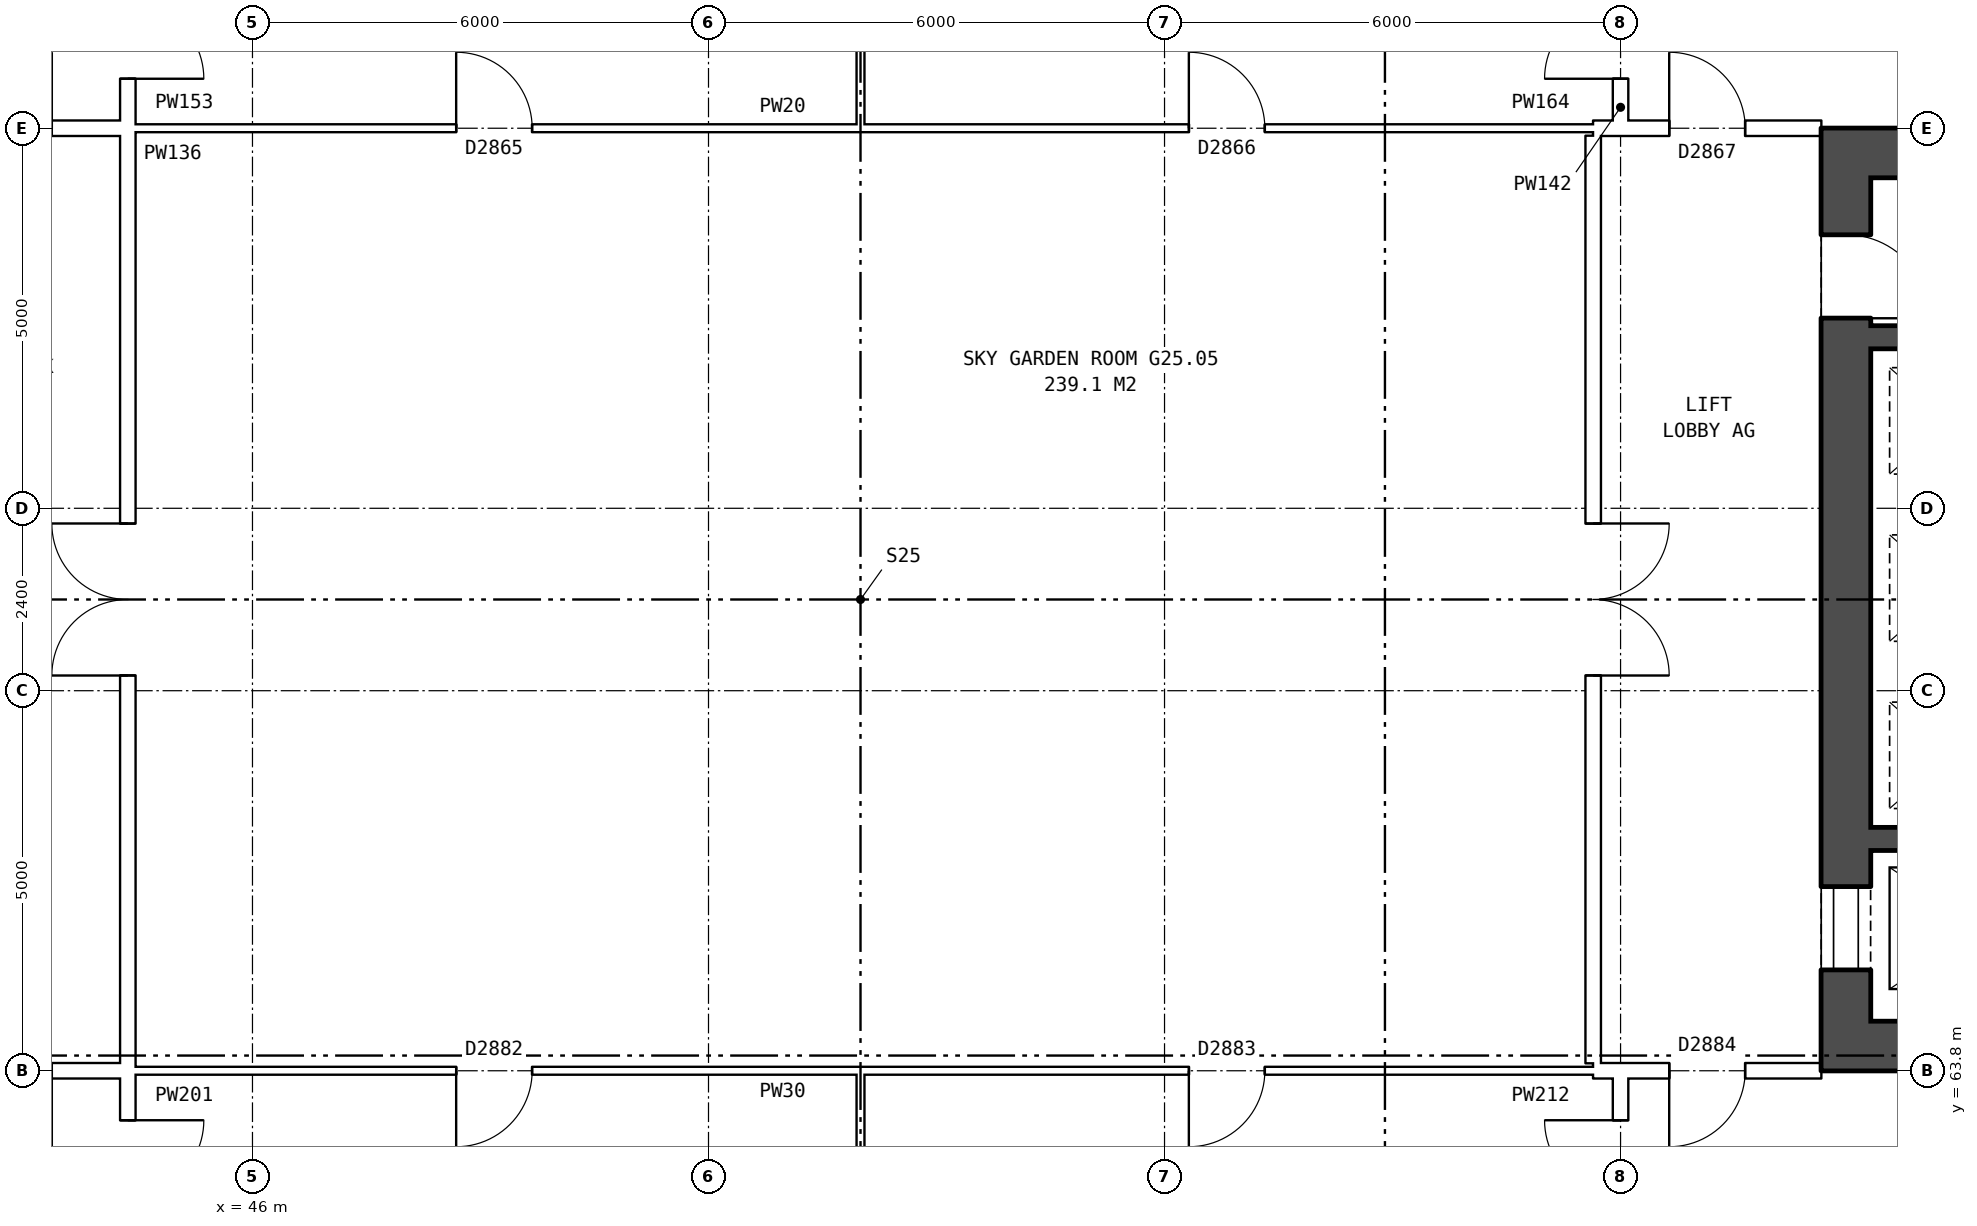
"""IFC4 building model, lengths in metres.
Left out: names, types, materials, properties, quantities, classifications, styles, units other than length and angle.
Written with IfcOpenShell. Run it as: python <this file> out.ifc"""

import sys

from ifc_helpers import new_model, si_unit, direction, frame, frame_2d, origin, place, context, subcontext, project, spatial, rectangle, extrude, element, fill, save


model = new_model("IFC4")
c1 = context("Model", 3, precision=1e-05, world=origin(), true_north=direction((0.0, 1.0)))
c2 = subcontext(c1, "Body", "Model", "MODEL_VIEW")
j1 = project(units=[si_unit("LENGTHUNIT", "METRE"), si_unit("PLANEANGLEUNIT", "RADIAN")], contexts=[c1])
p1 = place(None, origin())
s1 = spatial("IfcSite", under=j1, at=p1, CompositionType="ELEMENT")
p2 = place(p1, origin())
s2 = spatial("IfcBuilding", under=s1, at=p2, CompositionType="ELEMENT")
p3 = place(p2, frame((0.0, 0.0, 90.2)))
s3 = spatial("IfcBuildingStorey", under=s2, at=p3, CompositionType="ELEMENT", Elevation=90.2)
p4 = place(p3, frame((66.965, 64.45, 0.0), z_axis=(0.0, 0.0, 1.0), x_axis=(0.0, 1.0, 0.0)))
e1 = element("IfcWall", 1, at=p4, inside=s3, PredefinedType="SHEAR", context=c2, shape_type="SweptSolid", body=[
    extrude(rectangle(XDim=11.1, YDim=0.65, at=frame_2d((5.55, 0.0))), origin(), (0.0, 0.0, 1.0), 5.6),
])
p5 = place(p4, frame((0.675, 0.0, 0.0)))
e2 = element("IfcOpeningElement", 2, at=p5, cuts=e1, PredefinedType="OPENING", context=c2, shape_type="SweptSolid", body=[
    extrude(rectangle(XDim=1.1, YDim=2.1, at=frame_2d((0.55, 1.05))), frame((0.0, 0.335, 0.0), z_axis=(0.0, -1.0, 0.0), x_axis=(1.0, 0.0, 0.0)), (0.0, 0.0, 1.0), 0.67),
])
p6 = place(p4, frame((9.25, 0.0, 0.0)))
e3 = element("IfcOpeningElement", 3, at=p6, cuts=e1, PredefinedType="OPENING", context=c2, shape_type="SweptSolid", body=[
    extrude(rectangle(XDim=1.1, YDim=2.1, at=frame_2d((0.55, 1.05))), frame((0.0, 0.335, 0.0), z_axis=(0.0, -1.0, 0.0), x_axis=(1.0, 0.0, 0.0)), (0.0, 0.0, 1.0), 0.67),
])
for number, where, z_axis, x_axis in (
    (4, (66.64, 64.125, 0.0), (0.0, 0.0, 1.0), (1.0, 0.0, 0.0)),
    (5, (66.64, 75.875, 0.0), (0.0, 0.0, 1.0), (1.0, 0.0, 0.0)),
):
    element("IfcWall", number, at=place(p3, frame(where, z_axis=z_axis, x_axis=x_axis)), inside=s3, PredefinedType="SHEAR", context=c2, shape_type="SweptSolid", body=[
        extrude(rectangle(XDim=9.0, YDim=0.65, at=frame_2d((4.5, 0.0))), origin(), (0.0, 0.0, 1.0), 5.6),
    ])
p7 = place(p3, frame((67.29, 66.85, 0.0), z_axis=(0.0, 0.0, 1.0), x_axis=(1.0, 0.0, 0.0)))
e6 = element("IfcWall", 6, at=p7, inside=s3, PredefinedType="SHEAR", context=c2, shape_type="SweptSolid", body=[
    extrude(rectangle(XDim=3.37, YDim=0.3, at=frame_2d((1.685, 0.0))), origin(), (0.0, 0.0, 1.0), 5.6),
])
p8 = place(p3, frame((67.29, 73.45, 0.0), z_axis=(0.0, 0.0, 1.0), x_axis=(1.0, 0.0, 0.0)))
e7 = element("IfcWall", 7, at=p8, inside=s3, PredefinedType="SHEAR", context=c2, shape_type="SweptSolid", body=[
    extrude(rectangle(XDim=2.25, YDim=0.3, at=frame_2d((1.125, 0.0))), origin(), (0.0, 0.0, 1.0), 5.6),
])
p9 = place(p3, frame((63.64, 63.9, 0.0), z_axis=(0.0, 0.0, 1.0), x_axis=(0.0, 1.0, 0.0)))
e8 = element("IfcWall", 8, at=p9, inside=s3, PredefinedType="PARTITIONING", context=c2, shape_type="SweptSolid", body=[
    extrude(rectangle(XDim=12.2, YDim=0.2, at=frame_2d((6.1, 0.0))), origin(), (0.0, 0.0, 1.0), 5.6),
])
p10 = place(p9, frame((5.1, 0.0, 0.0)))
e9 = element("IfcOpeningElement", 9, at=p10, cuts=e8, PredefinedType="OPENING", context=c2, shape_type="SweptSolid", body=[
    extrude(rectangle(XDim=2.0, YDim=2.1, at=frame_2d((1.0, 1.05))), frame((0.0, 0.11, 0.0), z_axis=(0.0, -1.0, 0.0), x_axis=(1.0, 0.0, 0.0)), (0.0, 0.0, 1.0), 0.22),
])
p11 = place(p3, frame((44.36, 63.9, 0.0), z_axis=(0.0, 0.0, 1.0), x_axis=(0.0, 1.0, 0.0)))
e10 = element("IfcWall", 10, at=p11, inside=s3, PredefinedType="PARTITIONING", context=c2, shape_type="SweptSolid", body=[
    extrude(rectangle(XDim=12.2, YDim=0.2, at=frame_2d((6.1, 0.0))), origin(), (0.0, 0.0, 1.0), 5.6),
])
p12 = place(p11, frame((5.1, 0.0, 0.0)))
e11 = element("IfcOpeningElement", 11, at=p12, cuts=e10, PredefinedType="OPENING", context=c2, shape_type="SweptSolid", body=[
    extrude(rectangle(XDim=2.0, YDim=2.1, at=frame_2d((1.0, 1.05))), frame((0.0, 0.11, 0.0), z_axis=(0.0, -1.0, 0.0), x_axis=(1.0, 0.0, 0.0)), (0.0, 0.0, 1.0), 0.22),
])
p13 = place(p3, frame((41.36, 63.8, 0.0), z_axis=(0.0, 0.0, 1.0), x_axis=(1.0, 0.0, 0.0)))
e12 = element("IfcWall", 12, at=p13, inside=s3, PredefinedType="PARTITIONING", context=c2, shape_type="SweptSolid", body=[
    extrude(rectangle(XDim=3.1, YDim=0.2, at=frame_2d((1.55, 0.0))), origin(), (0.0, 0.0, 1.0), 5.6),
])
p14 = place(p13, frame((1.0, 0.0, 0.0)))
e13 = element("IfcOpeningElement", 13, at=p14, cuts=e12, PredefinedType="OPENING", context=c2, shape_type="SweptSolid", body=[
    extrude(rectangle(XDim=1.0, YDim=2.1, at=frame_2d((0.5, 1.05))), frame((0.0, 0.11, 0.0), z_axis=(0.0, -1.0, 0.0), x_axis=(1.0, 0.0, 0.0)), (0.0, 0.0, 1.0), 0.22),
])
p15 = place(p3, frame((63.64, 63.8, 0.0), z_axis=(0.0, 0.0, 1.0), x_axis=(1.0, 0.0, 0.0)))
e14 = element("IfcWall", 14, at=p15, inside=s3, PredefinedType="PARTITIONING", context=c2, shape_type="SweptSolid", body=[
    extrude(rectangle(XDim=3.0, YDim=0.2, at=frame_2d((1.5, 0.0))), origin(), (0.0, 0.0, 1.0), 5.6),
])
p16 = place(p15, frame((1.0, 0.0, 0.0)))
e15 = element("IfcOpeningElement", 15, at=p16, cuts=e14, PredefinedType="OPENING", context=c2, shape_type="SweptSolid", body=[
    extrude(rectangle(XDim=1.0, YDim=2.1, at=frame_2d((0.5, 1.05))), frame((0.0, 0.11, 0.0), z_axis=(0.0, -1.0, 0.0), x_axis=(1.0, 0.0, 0.0)), (0.0, 0.0, 1.0), 0.22),
])
p17 = place(p3, frame((44.26, 63.8, 0.0), z_axis=(0.0, 0.0, 1.0), x_axis=(1.0, 0.0, 0.0)))
e16 = element("IfcWall", 16, at=p17, inside=s3, PredefinedType="PARTITIONING", context=c2, shape_type="SweptSolid", body=[
    extrude(rectangle(XDim=19.38, YDim=0.1, at=frame_2d((9.69, 0.0))), origin(), (0.0, 0.0, 1.0), 5.6),
])
p18 = place(p17, frame((4.42, 0.0, 0.0)))
e17 = element("IfcOpeningElement", 17, at=p18, cuts=e16, PredefinedType="OPENING", context=c2, shape_type="SweptSolid", body=[
    extrude(rectangle(XDim=1.0, YDim=2.1, at=frame_2d((0.5, 1.05))), frame((0.0, 0.06, 0.0), z_axis=(0.0, -1.0, 0.0), x_axis=(1.0, 0.0, 0.0)), (0.0, 0.0, 1.0), 0.12),
])
p19 = place(p17, frame((14.06, 0.0, 0.0)))
e18 = element("IfcOpeningElement", 18, at=p19, cuts=e16, PredefinedType="OPENING", context=c2, shape_type="SweptSolid", body=[
    extrude(rectangle(XDim=1.0, YDim=2.1, at=frame_2d((0.5, 1.05))), frame((0.0, 0.06, 0.0), z_axis=(0.0, -1.0, 0.0), x_axis=(1.0, 0.0, 0.0)), (0.0, 0.0, 1.0), 0.12),
])
p20 = place(p3, frame((41.36, 76.2, 0.0), z_axis=(0.0, 0.0, 1.0), x_axis=(1.0, 0.0, 0.0)))
e19 = element("IfcWall", 19, at=p20, inside=s3, PredefinedType="PARTITIONING", context=c2, shape_type="SweptSolid", body=[
    extrude(rectangle(XDim=3.1, YDim=0.2, at=frame_2d((1.55, 0.0))), origin(), (0.0, 0.0, 1.0), 5.6),
])
p21 = place(p20, frame((1.0, 0.0, 0.0)))
e20 = element("IfcOpeningElement", 20, at=p21, cuts=e19, PredefinedType="OPENING", context=c2, shape_type="SweptSolid", body=[
    extrude(rectangle(XDim=1.0, YDim=2.1, at=frame_2d((0.5, 1.05))), frame((0.0, 0.11, 0.0), z_axis=(0.0, -1.0, 0.0), x_axis=(1.0, 0.0, 0.0)), (0.0, 0.0, 1.0), 0.22),
])
p22 = place(p3, frame((63.64, 76.2, 0.0), z_axis=(0.0, 0.0, 1.0), x_axis=(1.0, 0.0, 0.0)))
e21 = element("IfcWall", 21, at=p22, inside=s3, PredefinedType="PARTITIONING", context=c2, shape_type="SweptSolid", body=[
    extrude(rectangle(XDim=3.0, YDim=0.2, at=frame_2d((1.5, 0.0))), origin(), (0.0, 0.0, 1.0), 5.6),
])
p23 = place(p22, frame((1.0, 0.0, 0.0)))
e22 = element("IfcOpeningElement", 22, at=p23, cuts=e21, PredefinedType="OPENING", context=c2, shape_type="SweptSolid", body=[
    extrude(rectangle(XDim=1.0, YDim=2.1, at=frame_2d((0.5, 1.05))), frame((0.0, 0.11, 0.0), z_axis=(0.0, -1.0, 0.0), x_axis=(1.0, 0.0, 0.0)), (0.0, 0.0, 1.0), 0.22),
])
p24 = place(p3, frame((44.26, 76.2, 0.0), z_axis=(0.0, 0.0, 1.0), x_axis=(1.0, 0.0, 0.0)))
e23 = element("IfcWall", 23, at=p24, inside=s3, PredefinedType="PARTITIONING", context=c2, shape_type="SweptSolid", body=[
    extrude(rectangle(XDim=19.38, YDim=0.1, at=frame_2d((9.69, 0.0))), origin(), (0.0, 0.0, 1.0), 5.6),
])
p25 = place(p24, frame((4.42, 0.0, 0.0)))
e24 = element("IfcOpeningElement", 24, at=p25, cuts=e23, PredefinedType="OPENING", context=c2, shape_type="SweptSolid", body=[
    extrude(rectangle(XDim=1.0, YDim=2.1, at=frame_2d((0.5, 1.05))), frame((0.0, 0.06, 0.0), z_axis=(0.0, -1.0, 0.0), x_axis=(1.0, 0.0, 0.0)), (0.0, 0.0, 1.0), 0.12),
])
p26 = place(p24, frame((14.06, 0.0, 0.0)))
e25 = element("IfcOpeningElement", 25, at=p26, cuts=e23, PredefinedType="OPENING", context=c2, shape_type="SweptSolid", body=[
    extrude(rectangle(XDim=1.0, YDim=2.1, at=frame_2d((0.5, 1.05))), frame((0.0, 0.06, 0.0), z_axis=(0.0, -1.0, 0.0), x_axis=(1.0, 0.0, 0.0)), (0.0, 0.0, 1.0), 0.12),
])
p27 = place(p3, frame((44.36, 61.398, 0.0), z_axis=(0.0, 0.0, 1.0), x_axis=(0.0, 1.0, 0.0)))
e26 = element("IfcWall", 26, at=p27, inside=s3, PredefinedType="PARTITIONING", context=c2, shape_type="SweptSolid", body=[
    extrude(rectangle(XDim=2.502, YDim=0.2, at=frame_2d((1.251, 0.0))), origin(), (0.0, 0.0, 1.0), 5.6),
])
p28 = place(p27, frame((0.751, 0.0, 0.0)))
e27 = element("IfcOpeningElement", 27, at=p28, cuts=e26, PredefinedType="OPENING", context=c2, shape_type="SweptSolid", body=[
    extrude(rectangle(XDim=1.0, YDim=2.1, at=frame_2d((0.5, 1.05))), frame((0.0, 0.11, 0.0), z_axis=(0.0, -1.0, 0.0), x_axis=(1.0, 0.0, 0.0)), (0.0, 0.0, 1.0), 0.22),
])
p29 = place(p3, frame((44.36, 76.1, 0.0), z_axis=(0.0, 0.0, 1.0), x_axis=(0.0, 1.0, 0.0)))
e28 = element("IfcWall", 28, at=p29, inside=s3, PredefinedType="PARTITIONING", context=c2, shape_type="SweptSolid", body=[
    extrude(rectangle(XDim=2.502, YDim=0.2, at=frame_2d((1.251, 0.0))), origin(), (0.0, 0.0, 1.0), 5.6),
])
p30 = place(p29, frame((0.751, 0.0, 0.0)))
e29 = element("IfcOpeningElement", 29, at=p30, cuts=e28, PredefinedType="OPENING", context=c2, shape_type="SweptSolid", body=[
    extrude(rectangle(XDim=1.0, YDim=2.1, at=frame_2d((0.5, 1.05))), frame((0.0, 0.11, 0.0), z_axis=(0.0, -1.0, 0.0), x_axis=(1.0, 0.0, 0.0)), (0.0, 0.0, 1.0), 0.22),
])
for number, where, z_axis, x_axis in (
    (30, (54.0, 60.95, 0.0), (0.0, 0.0, 1.0), (0.0, 1.0, 0.0)),
    (31, (54.0, 76.15, 0.0), (0.0, 0.0, 1.0), (0.0, 1.0, 0.0)),
):
    element("IfcWall", number, at=place(p3, frame(where, z_axis=z_axis, x_axis=x_axis)), inside=s3, PredefinedType="PARTITIONING", context=c2, shape_type="SweptSolid", body=[
        extrude(rectangle(XDim=2.9, YDim=0.1, at=frame_2d((1.45, 0.0))), origin(), (0.0, 0.0, 1.0), 5.6),
    ])
p31 = place(p3, frame((64.0, 61.398, 0.0), z_axis=(0.0, 0.0, 1.0), x_axis=(0.0, 1.0, 0.0)))
e32 = element("IfcWall", 32, at=p31, inside=s3, PredefinedType="PARTITIONING", context=c2, shape_type="SweptSolid", body=[
    extrude(rectangle(XDim=2.502, YDim=0.2, at=frame_2d((1.251, 0.0))), origin(), (0.0, 0.0, 1.0), 5.6),
])
p32 = place(p31, frame((0.751, 0.0, 0.0)))
e33 = element("IfcOpeningElement", 33, at=p32, cuts=e32, PredefinedType="OPENING", context=c2, shape_type="SweptSolid", body=[
    extrude(rectangle(XDim=1.0, YDim=2.1, at=frame_2d((0.5, 1.05))), frame((0.0, 0.11, 0.0), z_axis=(0.0, -1.0, 0.0), x_axis=(1.0, 0.0, 0.0)), (0.0, 0.0, 1.0), 0.22),
])
p33 = place(p3, frame((64.0, 76.1, 0.0), z_axis=(0.0, 0.0, 1.0), x_axis=(0.0, 1.0, 0.0)))
e34 = element("IfcWall", 34, at=p33, inside=s3, PredefinedType="PARTITIONING", context=c2, shape_type="SweptSolid", body=[
    extrude(rectangle(XDim=2.502, YDim=0.2, at=frame_2d((1.251, 0.0))), origin(), (0.0, 0.0, 1.0), 5.6),
])
p34 = place(p33, frame((0.751, 0.0, 0.0)))
e35 = element("IfcOpeningElement", 35, at=p34, cuts=e34, PredefinedType="OPENING", context=c2, shape_type="SweptSolid", body=[
    extrude(rectangle(XDim=1.0, YDim=2.1, at=frame_2d((0.5, 1.05))), frame((0.0, 0.11, 0.0), z_axis=(0.0, -1.0, 0.0), x_axis=(1.0, 0.0, 0.0)), (0.0, 0.0, 1.0), 0.22),
])
p35 = place(p5, origin())
e36 = element("IfcDoor", 36, at=p35, inside=s3, OperationType="DOUBLE_DOOR_SLIDING", PredefinedType="DOOR", context=c2, shape_type="SweptSolid", body=[
    extrude(rectangle(XDim=1.1, YDim=2.1, at=frame_2d((0.55, 1.05))), frame((0.0, -0.26, 0.0), z_axis=(0.0, -1.0, 0.0), x_axis=(1.0, 0.0, 0.0)), (0.0, 0.0, 1.0), 0.05),
])
fill(e2, e36)
p36 = place(p6, frame((1.1, 0.0, 0.0), z_axis=(0.0, 0.0, 1.0), x_axis=(-1.0, 0.0, 0.0)))
e37 = element("IfcDoor", 37, at=p36, inside=s3, OperationType="SINGLE_SWING_RIGHT", PredefinedType="DOOR", context=c2, shape_type="SweptSolid", body=[
    extrude(rectangle(XDim=1.1, YDim=2.1, at=frame_2d((0.55, 1.05))), frame((0.0, 0.31, 0.0), z_axis=(0.0, -1.0, 0.0), x_axis=(1.0, 0.0, 0.0)), (0.0, 0.0, 1.0), 0.05),
])
fill(e3, e37)
p37 = place(p10, frame((2.0, 0.0, 0.0), z_axis=(0.0, 0.0, 1.0), x_axis=(-1.0, 0.0, 0.0)))
e38 = element("IfcDoor", 38, at=p37, inside=s3, OperationType="DOUBLE_DOOR_SINGLE_SWING", PredefinedType="DOOR", context=c2, shape_type="SweptSolid", body=[
    extrude(rectangle(XDim=2.0, YDim=2.1, at=frame_2d((1.0, 1.05))), frame((0.0, 0.025, 0.0), z_axis=(0.0, -1.0, 0.0), x_axis=(1.0, 0.0, 0.0)), (0.0, 0.0, 1.0), 0.05),
])
fill(e9, e38)
p38 = place(p12, origin())
e39 = element("IfcDoor", 39, at=p38, inside=s3, OperationType="DOUBLE_DOOR_SINGLE_SWING", PredefinedType="DOOR", context=c2, shape_type="SweptSolid", body=[
    extrude(rectangle(XDim=2.0, YDim=2.1, at=frame_2d((1.0, 1.05))), frame((0.0, 0.025, 0.0), z_axis=(0.0, -1.0, 0.0), x_axis=(1.0, 0.0, 0.0)), (0.0, 0.0, 1.0), 0.05),
])
fill(e11, e39)
p39 = place(p16, frame((1.0, 0.0, 0.0), z_axis=(0.0, 0.0, 1.0), x_axis=(-1.0, 0.0, 0.0)))
e40 = element("IfcDoor", 40, at=p39, inside=s3, OperationType="SINGLE_SWING_RIGHT", PredefinedType="DOOR", context=c2, shape_type="SweptSolid", body=[
    extrude(rectangle(XDim=1.0, YDim=2.1, at=frame_2d((0.5, 1.05))), frame((0.0, 0.025, 0.0), z_axis=(0.0, -1.0, 0.0), x_axis=(1.0, 0.0, 0.0)), (0.0, 0.0, 1.0), 0.05),
])
fill(e15, e40)
p40 = place(p18, frame((1.0, 0.0, 0.0), z_axis=(0.0, 0.0, 1.0), x_axis=(-1.0, 0.0, 0.0)))
e41 = element("IfcDoor", 41, at=p40, inside=s3, OperationType="SINGLE_SWING_RIGHT", PredefinedType="DOOR", context=c2, shape_type="SweptSolid", body=[
    extrude(rectangle(XDim=1.0, YDim=2.1, at=frame_2d((0.5, 1.05))), frame((0.0, 0.025, 0.0), z_axis=(0.0, -1.0, 0.0), x_axis=(1.0, 0.0, 0.0)), (0.0, 0.0, 1.0), 0.05),
])
fill(e17, e41)
p41 = place(p19, frame((1.0, 0.0, 0.0), z_axis=(0.0, 0.0, 1.0), x_axis=(-1.0, 0.0, 0.0)))
e42 = element("IfcDoor", 42, at=p41, inside=s3, OperationType="SINGLE_SWING_RIGHT", PredefinedType="DOOR", context=c2, shape_type="SweptSolid", body=[
    extrude(rectangle(XDim=1.0, YDim=2.1, at=frame_2d((0.5, 1.05))), frame((0.0, 0.025, 0.0), z_axis=(0.0, -1.0, 0.0), x_axis=(1.0, 0.0, 0.0)), (0.0, 0.0, 1.0), 0.05),
])
fill(e18, e42)
p42 = place(p23, origin())
e43 = element("IfcDoor", 43, at=p42, inside=s3, OperationType="SINGLE_SWING_LEFT", PredefinedType="DOOR", context=c2, shape_type="SweptSolid", body=[
    extrude(rectangle(XDim=1.0, YDim=2.1, at=frame_2d((0.5, 1.05))), frame((0.0, 0.025, 0.0), z_axis=(0.0, -1.0, 0.0), x_axis=(1.0, 0.0, 0.0)), (0.0, 0.0, 1.0), 0.05),
])
fill(e22, e43)
p43 = place(p25, origin())
e44 = element("IfcDoor", 44, at=p43, inside=s3, OperationType="SINGLE_SWING_LEFT", PredefinedType="DOOR", context=c2, shape_type="SweptSolid", body=[
    extrude(rectangle(XDim=1.0, YDim=2.1, at=frame_2d((0.5, 1.05))), frame((0.0, 0.025, 0.0), z_axis=(0.0, -1.0, 0.0), x_axis=(1.0, 0.0, 0.0)), (0.0, 0.0, 1.0), 0.05),
])
fill(e24, e44)
p44 = place(p26, origin())
e45 = element("IfcDoor", 45, at=p44, inside=s3, OperationType="SINGLE_SWING_LEFT", PredefinedType="DOOR", context=c2, shape_type="SweptSolid", body=[
    extrude(rectangle(XDim=1.0, YDim=2.1, at=frame_2d((0.5, 1.05))), frame((0.0, 0.025, 0.0), z_axis=(0.0, -1.0, 0.0), x_axis=(1.0, 0.0, 0.0)), (0.0, 0.0, 1.0), 0.05),
])
fill(e25, e45)
p45 = place(p28, frame((1.0, 0.0, 0.0), z_axis=(0.0, 0.0, 1.0), x_axis=(-1.0, 0.0, 0.0)))
e46 = element("IfcDoor", 46, at=p45, inside=s3, OperationType="SINGLE_SWING_LEFT", PredefinedType="DOOR", context=c2, shape_type="SweptSolid", body=[
    extrude(rectangle(XDim=1.0, YDim=2.1, at=frame_2d((0.5, 1.05))), frame((0.0, 0.025, 0.0), z_axis=(0.0, -1.0, 0.0), x_axis=(1.0, 0.0, 0.0)), (0.0, 0.0, 1.0), 0.05),
])
fill(e27, e46)
p46 = place(p30, frame((1.0, 0.0, 0.0), z_axis=(0.0, 0.0, 1.0), x_axis=(-1.0, 0.0, 0.0)))
e47 = element("IfcDoor", 47, at=p46, inside=s3, OperationType="SINGLE_SWING_RIGHT", PredefinedType="DOOR", context=c2, shape_type="SweptSolid", body=[
    extrude(rectangle(XDim=1.0, YDim=2.1, at=frame_2d((0.5, 1.05))), frame((0.0, 0.025, 0.0), z_axis=(0.0, -1.0, 0.0), x_axis=(1.0, 0.0, 0.0)), (0.0, 0.0, 1.0), 0.05),
])
fill(e29, e47)
p47 = place(p32, origin())
e48 = element("IfcDoor", 48, at=p47, inside=s3, OperationType="SINGLE_SWING_RIGHT", PredefinedType="DOOR", context=c2, shape_type="SweptSolid", body=[
    extrude(rectangle(XDim=1.0, YDim=2.1, at=frame_2d((0.5, 1.05))), frame((0.0, 0.025, 0.0), z_axis=(0.0, -1.0, 0.0), x_axis=(1.0, 0.0, 0.0)), (0.0, 0.0, 1.0), 0.05),
])
fill(e33, e48)
p48 = place(p34, origin())
e49 = element("IfcDoor", 49, at=p48, inside=s3, OperationType="SINGLE_SWING_LEFT", PredefinedType="DOOR", context=c2, shape_type="SweptSolid", body=[
    extrude(rectangle(XDim=1.0, YDim=2.1, at=frame_2d((0.5, 1.05))), frame((0.0, 0.025, 0.0), z_axis=(0.0, -1.0, 0.0), x_axis=(1.0, 0.0, 0.0)), (0.0, 0.0, 1.0), 0.05),
])
fill(e35, e49)
save(model, sys.argv[1])
